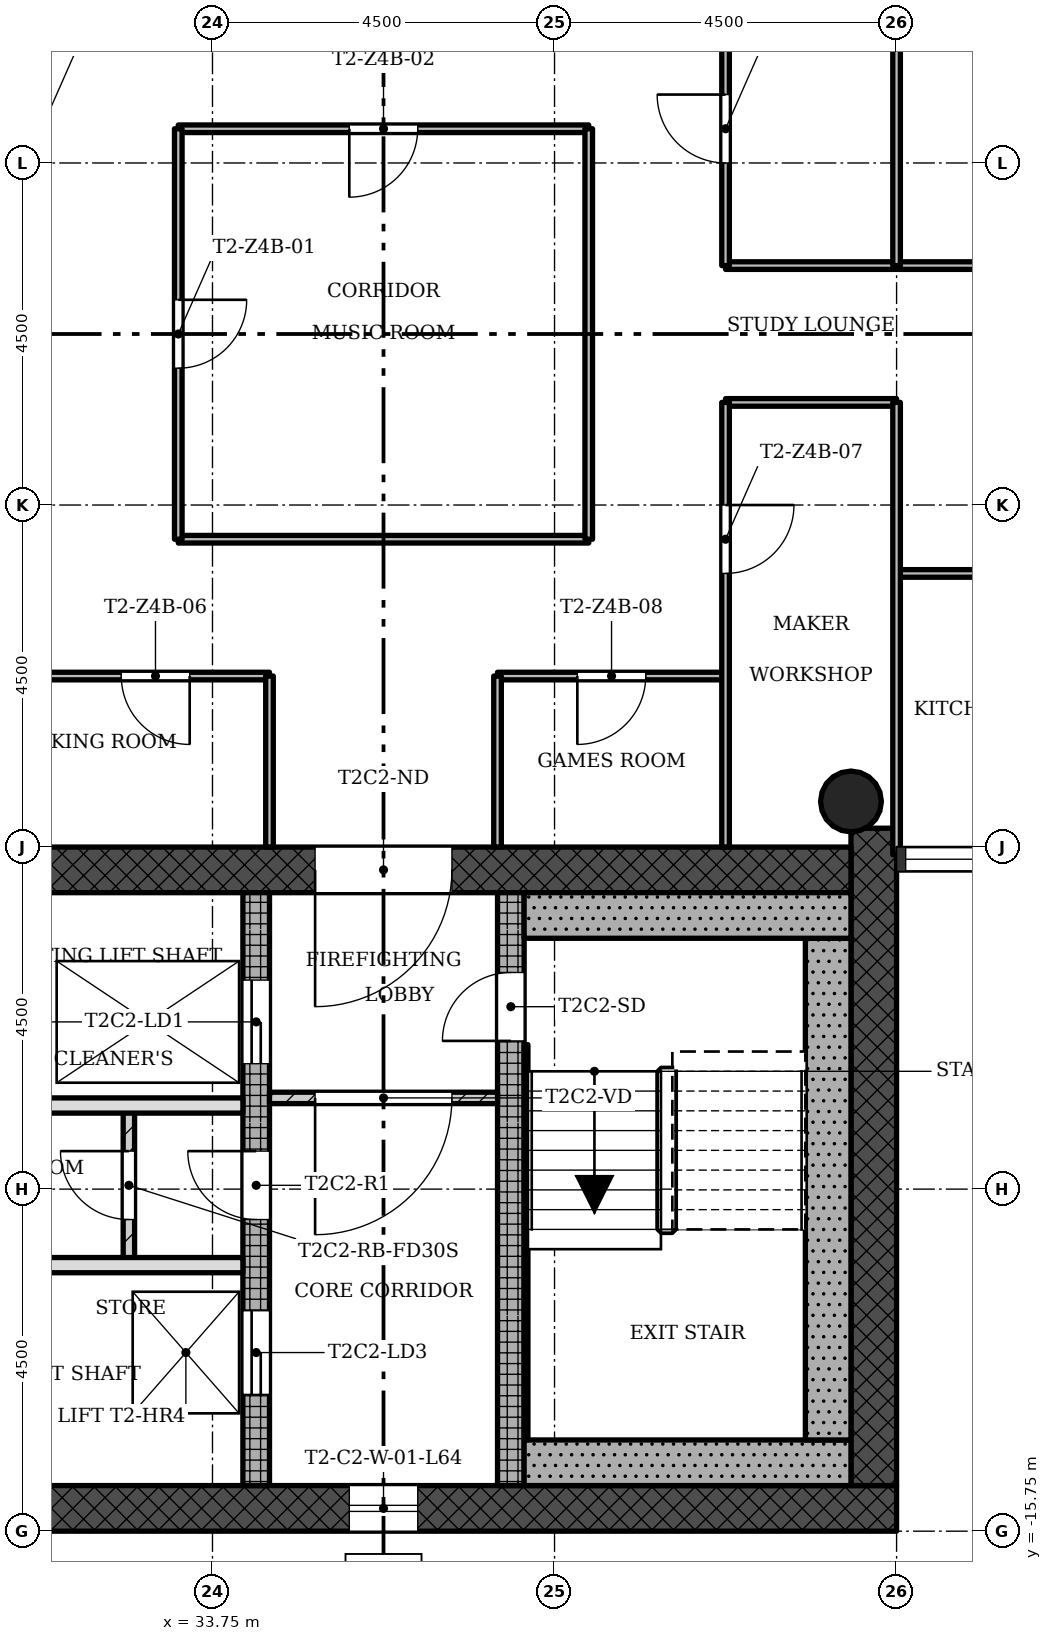
"""IFC4 building model, lengths in metres.
Left out: names, types, materials, properties, quantities, classifications, styles, units other than length and angle.
Written with IfcOpenShell. Run it as: python <this file> out.ifc"""

import sys

from ifc_helpers import new_model, si_unit, direction, frame, frame_2d, origin, origin_2d, place, context, subcontext, project, spatial, rectangle, hollow_circle, extrude, element, fill, save


model = new_model("IFC4")
c1 = context("Model", 3, precision=1e-05, world=origin(), true_north=direction((0.0, 1.0)))
c2 = subcontext(c1, "Body", "Model", "MODEL_VIEW")
j1 = project(units=[si_unit("LENGTHUNIT", "METRE"), si_unit("PLANEANGLEUNIT", "RADIAN")], contexts=[c1])
p1 = place(None, origin())
s1 = spatial("IfcSite", under=j1, at=p1, CompositionType="ELEMENT")
p2 = place(p1, origin())
s2 = spatial("IfcBuilding", under=s1, at=p2, CompositionType="ELEMENT")
p3 = place(p2, frame((0.0, 0.0, 230.0)))
s3 = spatial("IfcBuildingStorey", under=s2, at=p3, CompositionType="ELEMENT", Elevation=230.0)
p4 = place(p3, frame((29.85, -15.45, 0.0), z_axis=(0.0, 0.0, 1.0), x_axis=(1.0, 0.0, 0.0)))
e1 = element("IfcWall", 1, at=p4, inside=s3, PredefinedType="SHEAR", context=c2, shape_type="SweptSolid", body=[
    extrude(rectangle(XDim=12.9, YDim=0.6, at=frame_2d((6.45, 0.0))), origin(), (0.0, 0.0, 1.0), 3.4),
])
p5 = place(p4, frame((5.7, 0.0, 0.45)))
e2 = element("IfcOpeningElement", 2, at=p5, cuts=e1, PredefinedType="OPENING", context=c2, shape_type="SweptSolid", body=[
    extrude(rectangle(XDim=0.9, YDim=2.4, at=frame_2d((0.45, 1.2))), frame((0.0, 0.31, 0.0), z_axis=(0.0, -1.0, 0.0), x_axis=(1.0, 0.0, 0.0)), (0.0, 0.0, 1.0), 0.62),
])
p6 = place(p3, frame((42.45, -15.15, 0.0), z_axis=(0.0, 0.0, 1.0), x_axis=(0.0, 1.0, 0.0)))
e3 = element("IfcWall", 3, at=p6, inside=s3, PredefinedType="SHEAR", context=c2, shape_type="SweptSolid", body=[
    extrude(rectangle(XDim=8.648, YDim=0.6, at=frame_2d((4.324, 0.0))), origin(), (0.0, 0.0, 1.0), 3.4),
])
p7 = place(p3, frame((42.15, -7.05, 0.0), z_axis=(0.0, 0.0, 1.0), x_axis=(-1.0, 0.0, 0.0)))
e4 = element("IfcWall", 4, at=p7, inside=s3, PredefinedType="SHEAR", context=c2, shape_type="SweptSolid", body=[
    extrude(rectangle(XDim=12.9, YDim=0.6, at=frame_2d((6.45, 0.0))), origin(), (0.0, 0.0, 1.0), 3.4),
])
p8 = place(p7, frame((5.25, 0.0, 0.0)))
e5 = element("IfcOpeningElement", 5, at=p8, cuts=e4, PredefinedType="OPENING", context=c2, shape_type="SweptSolid", body=[
    extrude(rectangle(XDim=1.8, YDim=2.1, at=frame_2d((0.9, 1.05))), frame((0.0, 0.31, 0.0), z_axis=(0.0, -1.0, 0.0), x_axis=(1.0, 0.0, 0.0)), (0.0, 0.0, 1.0), 0.62),
])
p9 = place(p3, frame((34.325, -15.15, 0.0), z_axis=(0.0, 0.0, 1.0), x_axis=(0.0, 1.0, 0.0)))
e6 = element("IfcWall", 6, at=p9, inside=s3, PredefinedType="SHEAR", context=c2, shape_type="SweptSolid", body=[
    extrude(rectangle(XDim=7.8, YDim=0.35, at=frame_2d((3.9, 0.0))), origin(), (0.0, 0.0, 1.0), 3.4),
])
p10 = place(p9, frame((5.55, 0.0, 0.0)))
e7 = element("IfcOpeningElement", 7, at=p10, cuts=e6, PredefinedType="OPENING", context=c2, shape_type="SweptSolid", body=[
    extrude(rectangle(XDim=1.1, YDim=2.1, at=frame_2d((0.55, 1.05))), frame((0.0, 0.185, 0.0), z_axis=(0.0, -1.0, 0.0), x_axis=(1.0, 0.0, 0.0)), (0.0, 0.0, 1.0), 0.37),
])
p11 = place(p9, frame((1.2, 0.0, 0.0)))
e8 = element("IfcOpeningElement", 8, at=p11, cuts=e6, PredefinedType="OPENING", context=c2, shape_type="SweptSolid", body=[
    extrude(rectangle(XDim=1.1, YDim=2.1, at=frame_2d((0.55, 1.05))), frame((0.0, 0.185, 0.0), z_axis=(0.0, -1.0, 0.0), x_axis=(1.0, 0.0, 0.0)), (0.0, 0.0, 1.0), 0.37),
])
p12 = place(p9, frame((3.5, 0.0, 0.0)))
e9 = element("IfcOpeningElement", 9, at=p12, cuts=e6, PredefinedType="OPENING", context=c2, shape_type="SweptSolid", body=[
    extrude(rectangle(XDim=0.9, YDim=2.1, at=frame_2d((0.45, 1.05))), frame((0.0, 0.185, 0.0), z_axis=(0.0, -1.0, 0.0), x_axis=(1.0, 0.0, 0.0)), (0.0, 0.0, 1.0), 0.37),
])
p13 = place(p3, frame((37.675, -15.15, 0.0), z_axis=(0.0, 0.0, 1.0), x_axis=(0.0, 1.0, 0.0)))
e10 = element("IfcWall", 10, at=p13, inside=s3, PredefinedType="SHEAR", context=c2, shape_type="SweptSolid", body=[
    extrude(rectangle(XDim=7.8, YDim=0.35, at=frame_2d((3.9, 0.0))), origin(), (0.0, 0.0, 1.0), 3.4),
])
p14 = place(p13, frame((5.85, 0.0, 0.0)))
e11 = element("IfcOpeningElement", 11, at=p14, cuts=e10, PredefinedType="OPENING", context=c2, shape_type="SweptSolid", body=[
    extrude(rectangle(XDim=0.9, YDim=2.1, at=frame_2d((0.45, 1.05))), frame((0.0, 0.185, 0.0), z_axis=(0.0, -1.0, 0.0), x_axis=(1.0, 0.0, 0.0)), (0.0, 0.0, 1.0), 0.37),
])
p15 = place(p3, frame((42.15, -6.15, 0.0), z_axis=(0.0, 0.0, 1.0), x_axis=(1.0, 0.0, 0.0)))
e12 = element("IfcColumn", 12, at=p15, inside=s3, PredefinedType="COLUMN", context=c2, shape_type="SweptSolid", body=[
    extrude(hollow_circle(Radius=0.4, WallThickness=0.028, at=origin_2d()), origin(), (0.0, 0.0, 1.0), 3.4),
])
p16 = place(p3, frame((34.5, -10.05, 0.0), z_axis=(0.0, 0.0, 1.0), x_axis=(1.0, 0.0, 0.0)))
e13 = element("IfcWall", 13, at=p16, inside=s3, PredefinedType="PARTITIONING", context=c2, shape_type="SweptSolid", body=[
    extrude(rectangle(XDim=3.0, YDim=0.15, at=frame_2d((1.5, 0.0))), origin(), (0.0, 0.0, 1.0), 2.98),
])
p17 = place(p16, frame((0.6, 0.0, 0.0)))
e14 = element("IfcOpeningElement", 14, at=p17, cuts=e13, PredefinedType="OPENING", context=c2, shape_type="SweptSolid", body=[
    extrude(rectangle(XDim=1.8, YDim=2.1, at=frame_2d((0.9, 1.05))), frame((0.0, 0.085, 0.0), z_axis=(0.0, -1.0, 0.0), x_axis=(1.0, 0.0, 0.0)), (0.0, 0.0, 1.0), 0.17),
])
for number, where, z_axis, x_axis in (
    (15, (29.85, -12.25, 0.0), (0.0, 0.0, 1.0), (1.0, 0.0, 0.0)),
    (16, (29.85, -10.15, 0.0), (0.0, 0.0, 1.0), (1.0, 0.0, 0.0)),
):
    element("IfcWall", number, at=place(p3, frame(where, z_axis=z_axis, x_axis=x_axis)), inside=s3, PredefinedType="SOLIDWALL", context=c2, shape_type="SweptSolid", body=[
        extrude(rectangle(XDim=4.3, YDim=0.2, at=frame_2d((2.15, 0.0))), origin(), (0.0, 0.0, 1.0), 2.98),
    ])
p18 = place(p3, frame((32.65, -10.15, 0.0), z_axis=(0.0, 0.0, 1.0), x_axis=(0.0, -1.0, 0.0)))
e17 = element("IfcWall", 17, at=p18, inside=s3, PredefinedType="PARTITIONING", context=c2, shape_type="SweptSolid", body=[
    extrude(rectangle(XDim=2.1, YDim=0.15, at=frame_2d((1.05, 0.0))), origin(), (0.0, 0.0, 1.0), 2.98),
])
p19 = place(p18, frame((0.6, 0.0, 0.0)))
e18 = element("IfcOpeningElement", 18, at=p19, cuts=e17, PredefinedType="OPENING", context=c2, shape_type="SweptSolid", body=[
    extrude(rectangle(XDim=0.9, YDim=2.1, at=frame_2d((0.45, 1.05))), frame((0.0, 0.085, 0.0), z_axis=(0.0, -1.0, 0.0), x_axis=(1.0, 0.0, 0.0)), (0.0, 0.0, 1.0), 0.17),
])
p20 = place(p3, frame((40.5, -4.5, 0.0), z_axis=(0.0, 0.0, 1.0), x_axis=(-1.0, 0.0, 0.0)))
e19 = element("IfcWall", 19, at=p20, inside=s3, PredefinedType="PARTITIONING", context=c2, shape_type="SweptSolid", body=[
    extrude(rectangle(XDim=3.0, YDim=0.1, at=frame_2d((1.5, 0.0))), origin(), (0.0, 0.0, 1.0), 2.98),
])
p21 = place(p20, frame((1.05, 0.0, 0.0)))
e20 = element("IfcOpeningElement", 20, at=p21, cuts=e19, PredefinedType="OPENING", context=c2, shape_type="SweptSolid", body=[
    extrude(rectangle(XDim=0.9, YDim=2.1, at=frame_2d((0.45, 1.05))), frame((0.0, 0.06, 0.0), z_axis=(0.0, -1.0, 0.0), x_axis=(1.0, 0.0, 0.0)), (0.0, 0.0, 1.0), 0.12),
])
p22 = place(p3, frame((34.5, -4.5, 0.0), z_axis=(0.0, 0.0, 1.0), x_axis=(-1.0, 0.0, 0.0)))
e21 = element("IfcWall", 21, at=p22, inside=s3, PredefinedType="PARTITIONING", context=c2, shape_type="SweptSolid", body=[
    extrude(rectangle(XDim=5.25, YDim=0.1, at=frame_2d((2.625, 0.0))), origin(), (0.0, 0.0, 1.0), 2.98),
])
p23 = place(p22, frame((1.05, 0.0, 0.0)))
e22 = element("IfcOpeningElement", 22, at=p23, cuts=e21, PredefinedType="OPENING", context=c2, shape_type="SweptSolid", body=[
    extrude(rectangle(XDim=0.9, YDim=2.1, at=frame_2d((0.45, 1.05))), frame((0.0, 0.06, 0.0), z_axis=(0.0, -1.0, 0.0), x_axis=(1.0, 0.0, 0.0)), (0.0, 0.0, 1.0), 0.12),
])
p24 = place(p3, frame((47.25, -3.15, 0.0), z_axis=(0.0, 0.0, 1.0), x_axis=(-1.0, 0.0, 0.0)))
e23 = element("IfcWall", 23, at=p24, inside=s3, PredefinedType="PARTITIONING", context=c2, shape_type="SweptSolid", body=[
    extrude(rectangle(XDim=4.5, YDim=0.1, at=frame_2d((2.25, 0.0))), origin(), (0.0, 0.0, 1.0), 2.98),
])
p25 = place(p24, frame((1.8, 0.0, 0.0)))
e24 = element("IfcOpeningElement", 24, at=p25, cuts=e23, PredefinedType="OPENING", context=c2, shape_type="SweptSolid", body=[
    extrude(rectangle(XDim=0.9, YDim=2.1, at=frame_2d((0.45, 1.05))), frame((0.0, 0.06, 0.0), z_axis=(0.0, -1.0, 0.0), x_axis=(1.0, 0.0, 0.0)), (0.0, 0.0, 1.0), 0.12),
])
p26 = place(p3, frame((38.7, -2.7, 0.0), z_axis=(0.0, 0.0, 1.0), x_axis=(-1.0, 0.0, 0.0)))
e25 = element("IfcWall", 25, at=p26, inside=s3, PredefinedType="PARTITIONING", context=c2, shape_type="SweptSolid", body=[
    extrude(rectangle(XDim=5.4, YDim=0.1, at=frame_2d((2.7, 0.0))), origin(), (0.0, 0.0, 1.0), 2.98),
])
p27 = place(p3, frame((42.75, -0.9, 0.0), z_axis=(0.0, 0.0, 1.0), x_axis=(-1.0, 0.0, 0.0)))
e26 = element("IfcWall", 26, at=p27, inside=s3, PredefinedType="PARTITIONING", context=c2, shape_type="SweptSolid", body=[
    extrude(rectangle(XDim=2.25, YDim=0.1, at=frame_2d((1.125, 0.0))), origin(), (0.0, 0.0, 1.0), 2.98),
])
p28 = place(p3, frame((44.55, 0.9, 0.0), z_axis=(0.0, 0.0, 1.0), x_axis=(-1.0, 0.0, 0.0)))
e27 = element("IfcWall", 27, at=p28, inside=s3, PredefinedType="PARTITIONING", context=c2, shape_type="SweptSolid", body=[
    extrude(rectangle(XDim=4.05, YDim=0.1, at=frame_2d((2.025, 0.0))), origin(), (0.0, 0.0, 1.0), 2.98),
])
p29 = place(p3, frame((38.7, 2.7, 0.0), z_axis=(0.0, 0.0, 1.0), x_axis=(-1.0, 0.0, 0.0)))
e28 = element("IfcWall", 28, at=p29, inside=s3, PredefinedType="PARTITIONING", context=c2, shape_type="SweptSolid", body=[
    extrude(rectangle(XDim=5.4, YDim=0.1, at=frame_2d((2.7, 0.0))), origin(), (0.0, 0.0, 1.0), 2.98),
])
p30 = place(p29, frame((2.25, 0.0, 0.0)))
e29 = element("IfcOpeningElement", 29, at=p30, cuts=e28, PredefinedType="OPENING", context=c2, shape_type="SweptSolid", body=[
    extrude(rectangle(XDim=0.9, YDim=2.1, at=frame_2d((0.45, 1.05))), frame((0.0, 0.06, 0.0), z_axis=(0.0, -1.0, 0.0), x_axis=(1.0, 0.0, 0.0)), (0.0, 0.0, 1.0), 0.12),
])
for number, where, z_axis, x_axis in (
    (30, (42.75, -6.85, 0.0), (0.0, 0.0, 1.0), (0.0, 1.0, 0.0)),
    (31, (42.75, 0.9, 0.0), (0.0, 0.0, 1.0), (0.0, 1.0, 0.0)),
):
    element("IfcWall", number, at=place(p3, frame(where, z_axis=z_axis, x_axis=x_axis)), inside=s3, PredefinedType="PARTITIONING", context=c2, shape_type="SweptSolid", body=[
        extrude(rectangle(XDim=5.95, YDim=0.1, at=frame_2d((2.975, 0.0))), origin(), (0.0, 0.0, 1.0), 2.98),
    ])
p31 = place(p3, frame((40.5, -6.75, 0.0), z_axis=(0.0, 0.0, 1.0), x_axis=(0.0, 1.0, 0.0)))
e32 = element("IfcWall", 32, at=p31, inside=s3, PredefinedType="PARTITIONING", context=c2, shape_type="SweptSolid", body=[
    extrude(rectangle(XDim=5.85, YDim=0.1, at=frame_2d((2.925, 0.0))), origin(), (0.0, 0.0, 1.0), 2.98),
])
p32 = place(p31, frame((3.6, 0.0, 0.0)))
e33 = element("IfcOpeningElement", 33, at=p32, cuts=e32, PredefinedType="OPENING", context=c2, shape_type="SweptSolid", body=[
    extrude(rectangle(XDim=0.9, YDim=2.1, at=frame_2d((0.45, 1.05))), frame((0.0, 0.06, 0.0), z_axis=(0.0, -1.0, 0.0), x_axis=(1.0, 0.0, 0.0)), (0.0, 0.0, 1.0), 0.12),
])
p33 = place(p3, frame((40.5, 0.9, 0.0), z_axis=(0.0, 0.0, 1.0), x_axis=(0.0, 1.0, 0.0)))
e34 = element("IfcWall", 34, at=p33, inside=s3, PredefinedType="PARTITIONING", context=c2, shape_type="SweptSolid", body=[
    extrude(rectangle(XDim=3.6, YDim=0.1, at=frame_2d((1.8, 0.0))), origin(), (0.0, 0.0, 1.0), 2.98),
])
p34 = place(p33, frame((1.35, 0.0, 0.0)))
e35 = element("IfcOpeningElement", 35, at=p34, cuts=e34, PredefinedType="OPENING", context=c2, shape_type="SweptSolid", body=[
    extrude(rectangle(XDim=0.9, YDim=2.1, at=frame_2d((0.45, 1.05))), frame((0.0, 0.06, 0.0), z_axis=(0.0, -1.0, 0.0), x_axis=(1.0, 0.0, 0.0)), (0.0, 0.0, 1.0), 0.12),
])
p35 = place(p3, frame((38.7, -2.7, 0.0), z_axis=(0.0, 0.0, 1.0), x_axis=(0.0, 1.0, 0.0)))
e36 = element("IfcWall", 36, at=p35, inside=s3, PredefinedType="PARTITIONING", context=c2, shape_type="SweptSolid", body=[
    extrude(rectangle(XDim=5.4, YDim=0.1, at=frame_2d((2.7, 0.0))), origin(), (0.0, 0.0, 1.0), 2.98),
])
for number, where, z_axis, x_axis in (
    (37, (37.5, -6.75, 0.0), (0.0, 0.0, 1.0), (0.0, 1.0, 0.0)),
    (38, (34.5, -6.75, 0.0), (0.0, 0.0, 1.0), (0.0, 1.0, 0.0)),
):
    element("IfcWall", number, at=place(p3, frame(where, z_axis=z_axis, x_axis=x_axis)), inside=s3, PredefinedType="PARTITIONING", context=c2, shape_type="SweptSolid", body=[
        extrude(rectangle(XDim=2.25, YDim=0.1, at=frame_2d((1.125, 0.0))), origin(), (0.0, 0.0, 1.0), 2.98),
    ])
p36 = place(p3, frame((33.3, -2.7, 0.0), z_axis=(0.0, 0.0, 1.0), x_axis=(0.0, 1.0, 0.0)))
e39 = element("IfcWall", 39, at=p36, inside=s3, PredefinedType="PARTITIONING", context=c2, shape_type="SweptSolid", body=[
    extrude(rectangle(XDim=5.4, YDim=0.1, at=frame_2d((2.7, 0.0))), origin(), (0.0, 0.0, 1.0), 2.98),
])
p37 = place(p36, frame((2.25, 0.0, 0.0)))
e40 = element("IfcOpeningElement", 40, at=p37, cuts=e39, PredefinedType="OPENING", context=c2, shape_type="SweptSolid", body=[
    extrude(rectangle(XDim=0.9, YDim=2.1, at=frame_2d((0.45, 1.05))), frame((0.0, 0.06, 0.0), z_axis=(0.0, -1.0, 0.0), x_axis=(1.0, 0.0, 0.0)), (0.0, 0.0, 1.0), 0.12),
])
p38 = place(p3, frame((37.85, -14.85, 0.0), z_axis=(0.0, 0.0, 1.0), x_axis=(1.0, 0.0, 0.0)))
e41 = element("IfcWall", 41, at=p38, inside=s3, PredefinedType="SHEAR", context=c2, shape_type="SweptSolid", body=[
    extrude(rectangle(XDim=4.3, YDim=0.6, at=frame_2d((2.15, 0.0))), origin(), (0.0, 0.0, 1.0), 3.4),
])
p39 = place(p3, frame((41.85, -7.95, 0.0), z_axis=(0.0, 0.0, 1.0), x_axis=(0.0, -1.0, 0.0)))
e42 = element("IfcWall", 42, at=p39, inside=s3, PredefinedType="SHEAR", context=c2, shape_type="SweptSolid", body=[
    extrude(rectangle(XDim=6.6, YDim=0.6, at=frame_2d((3.3, 0.0))), origin(), (0.0, 0.0, 1.0), 3.4),
])
p40 = place(p3, frame((37.85, -7.65, 0.0), z_axis=(0.0, 0.0, 1.0), x_axis=(1.0, 0.0, 0.0)))
e43 = element("IfcWall", 43, at=p40, inside=s3, PredefinedType="SHEAR", context=c2, shape_type="SweptSolid", body=[
    extrude(rectangle(XDim=4.3, YDim=0.6, at=frame_2d((2.15, 0.0))), origin(), (0.0, 0.0, 1.0), 3.4),
])
p41 = place(p3, frame((37.875, -9.35, 0.0), z_axis=(0.0, 0.0, 1.0), x_axis=(0.0, -1.0, 0.0)))
e44 = element("IfcWall", 44, at=p41, inside=s3, PredefinedType="SHEAR", context=c2, shape_type="SweptSolid", body=[
    extrude(rectangle(XDim=5.2, YDim=0.05, at=frame_2d((2.6, 0.0))), origin(), (0.0, 0.0, 1.0), 3.4),
])
p42 = place(p5, origin())
e45 = element("IfcWindow", 45, at=p42, inside=s3, PartitioningType="SINGLE_PANEL", PredefinedType="WINDOW", context=c2, shape_type="SweptSolid", body=[
    extrude(rectangle(XDim=0.9, YDim=2.4, at=frame_2d((0.45, 1.2))), frame((0.0, 0.03, 0.0), z_axis=(0.0, -1.0, 0.0), x_axis=(1.0, 0.0, 0.0)), (0.0, 0.0, 1.0), 0.06),
])
fill(e2, e45)
p43 = place(p17, origin())
e46 = element("IfcDoor", 46, at=p43, inside=s3, OperationType="SINGLE_SWING_LEFT", PredefinedType="DOOR", context=c2, shape_type="SweptSolid", body=[
    extrude(rectangle(XDim=1.8, YDim=2.1, at=frame_2d((0.9, 1.05))), frame((0.0, 0.025, 0.0), z_axis=(0.0, -1.0, 0.0), x_axis=(1.0, 0.0, 0.0)), (0.0, 0.0, 1.0), 0.05),
])
fill(e14, e46)
p44 = place(p19, origin())
e47 = element("IfcDoor", 47, at=p44, inside=s3, OperationType="SINGLE_SWING_LEFT", PredefinedType="DOOR", context=c2, shape_type="SweptSolid", body=[
    extrude(rectangle(XDim=0.9, YDim=2.1, at=frame_2d((0.45, 1.05))), frame((0.0, 0.025, 0.0), z_axis=(0.0, -1.0, 0.0), x_axis=(1.0, 0.0, 0.0)), (0.0, 0.0, 1.0), 0.05),
])
fill(e18, e47)
p45 = place(p37, origin())
e48 = element("IfcDoor", 48, at=p45, inside=s3, OperationType="SINGLE_SWING_RIGHT", PredefinedType="DOOR", context=c2, shape_type="SweptSolid", body=[
    extrude(rectangle(XDim=0.9, YDim=2.1, at=frame_2d((0.45, 1.05))), frame((0.0, 0.025, 0.0), z_axis=(0.0, -1.0, 0.0), x_axis=(1.0, 0.0, 0.0)), (0.0, 0.0, 1.0), 0.05),
])
fill(e40, e48)
p46 = place(p30, origin())
e49 = element("IfcDoor", 49, at=p46, inside=s3, OperationType="SINGLE_SWING_LEFT", PredefinedType="DOOR", context=c2, shape_type="SweptSolid", body=[
    extrude(rectangle(XDim=0.9, YDim=2.1, at=frame_2d((0.45, 1.05))), frame((0.0, 0.025, 0.0), z_axis=(0.0, -1.0, 0.0), x_axis=(1.0, 0.0, 0.0)), (0.0, 0.0, 1.0), 0.05),
])
fill(e29, e49)
p47 = place(p23, origin())
e50 = element("IfcDoor", 50, at=p47, inside=s3, OperationType="SINGLE_SWING_RIGHT", PredefinedType="DOOR", context=c2, shape_type="SweptSolid", body=[
    extrude(rectangle(XDim=0.9, YDim=2.1, at=frame_2d((0.45, 1.05))), frame((0.0, 0.025, 0.0), z_axis=(0.0, -1.0, 0.0), x_axis=(1.0, 0.0, 0.0)), (0.0, 0.0, 1.0), 0.05),
])
fill(e22, e50)
p48 = place(p32, origin())
e51 = element("IfcDoor", 51, at=p48, inside=s3, OperationType="SINGLE_SWING_RIGHT", PredefinedType="DOOR", context=c2, shape_type="SweptSolid", body=[
    extrude(rectangle(XDim=0.9, YDim=2.1, at=frame_2d((0.45, 1.05))), frame((0.0, 0.025, 0.0), z_axis=(0.0, -1.0, 0.0), x_axis=(1.0, 0.0, 0.0)), (0.0, 0.0, 1.0), 0.05),
])
fill(e33, e51)
p49 = place(p21, origin())
e52 = element("IfcDoor", 52, at=p49, inside=s3, OperationType="SINGLE_SWING_LEFT", PredefinedType="DOOR", context=c2, shape_type="SweptSolid", body=[
    extrude(rectangle(XDim=0.9, YDim=2.1, at=frame_2d((0.45, 1.05))), frame((0.0, 0.025, 0.0), z_axis=(0.0, -1.0, 0.0), x_axis=(1.0, 0.0, 0.0)), (0.0, 0.0, 1.0), 0.05),
])
fill(e20, e52)
p50 = place(p34, origin())
e53 = element("IfcDoor", 53, at=p50, inside=s3, OperationType="SINGLE_SWING_LEFT", PredefinedType="DOOR", context=c2, shape_type="SweptSolid", body=[
    extrude(rectangle(XDim=0.9, YDim=2.1, at=frame_2d((0.45, 1.05))), frame((0.0, 0.025, 0.0), z_axis=(0.0, -1.0, 0.0), x_axis=(1.0, 0.0, 0.0)), (0.0, 0.0, 1.0), 0.05),
])
fill(e35, e53)
p51 = place(p14, origin())
e54 = element("IfcDoor", 54, at=p51, inside=s3, OperationType="SINGLE_SWING_RIGHT", PredefinedType="DOOR", context=c2, shape_type="SweptSolid", body=[
    extrude(rectangle(XDim=0.9, YDim=2.1, at=frame_2d((0.45, 1.05))), frame((0.0, 0.025, 0.0), z_axis=(0.0, -1.0, 0.0), x_axis=(1.0, 0.0, 0.0)), (0.0, 0.0, 1.0), 0.05),
])
fill(e11, e54)
p52 = place(p10, origin())
e55 = element("IfcDoor", 55, at=p52, inside=s3, OperationType="SLIDING_TO_LEFT", PredefinedType="DOOR", context=c2, shape_type="SweptSolid", body=[
    extrude(rectangle(XDim=1.1, YDim=2.1, at=frame_2d((0.55, 1.05))), frame((0.0, 0.025, 0.0), z_axis=(0.0, -1.0, 0.0), x_axis=(1.0, 0.0, 0.0)), (0.0, 0.0, 1.0), 0.05),
])
fill(e7, e55)
p53 = place(p11, origin())
e56 = element("IfcDoor", 56, at=p53, inside=s3, OperationType="SLIDING_TO_LEFT", PredefinedType="DOOR", context=c2, shape_type="SweptSolid", body=[
    extrude(rectangle(XDim=1.1, YDim=2.1, at=frame_2d((0.55, 1.05))), frame((0.0, 0.025, 0.0), z_axis=(0.0, -1.0, 0.0), x_axis=(1.0, 0.0, 0.0)), (0.0, 0.0, 1.0), 0.05),
])
fill(e8, e56)
p54 = place(p12, origin())
e57 = element("IfcDoor", 57, at=p54, inside=s3, OperationType="SINGLE_SWING_LEFT", PredefinedType="DOOR", context=c2, shape_type="SweptSolid", body=[
    extrude(rectangle(XDim=0.9, YDim=2.1, at=frame_2d((0.45, 1.05))), frame((0.0, 0.025, 0.0), z_axis=(0.0, -1.0, 0.0), x_axis=(1.0, 0.0, 0.0)), (0.0, 0.0, 1.0), 0.05),
])
fill(e9, e57)
p55 = place(p8, origin())
e58 = element("IfcDoor", 58, at=p55, inside=s3, OperationType="SINGLE_SWING_LEFT", PredefinedType="DOOR", context=c2, shape_type="SweptSolid", body=[
    extrude(rectangle(XDim=1.8, YDim=2.1, at=frame_2d((0.9, 1.05))), frame((0.0, 0.025, 0.0), z_axis=(0.0, -1.0, 0.0), x_axis=(1.0, 0.0, 0.0)), (0.0, 0.0, 1.0), 0.05),
])
fill(e5, e58)
save(model, sys.argv[1])
